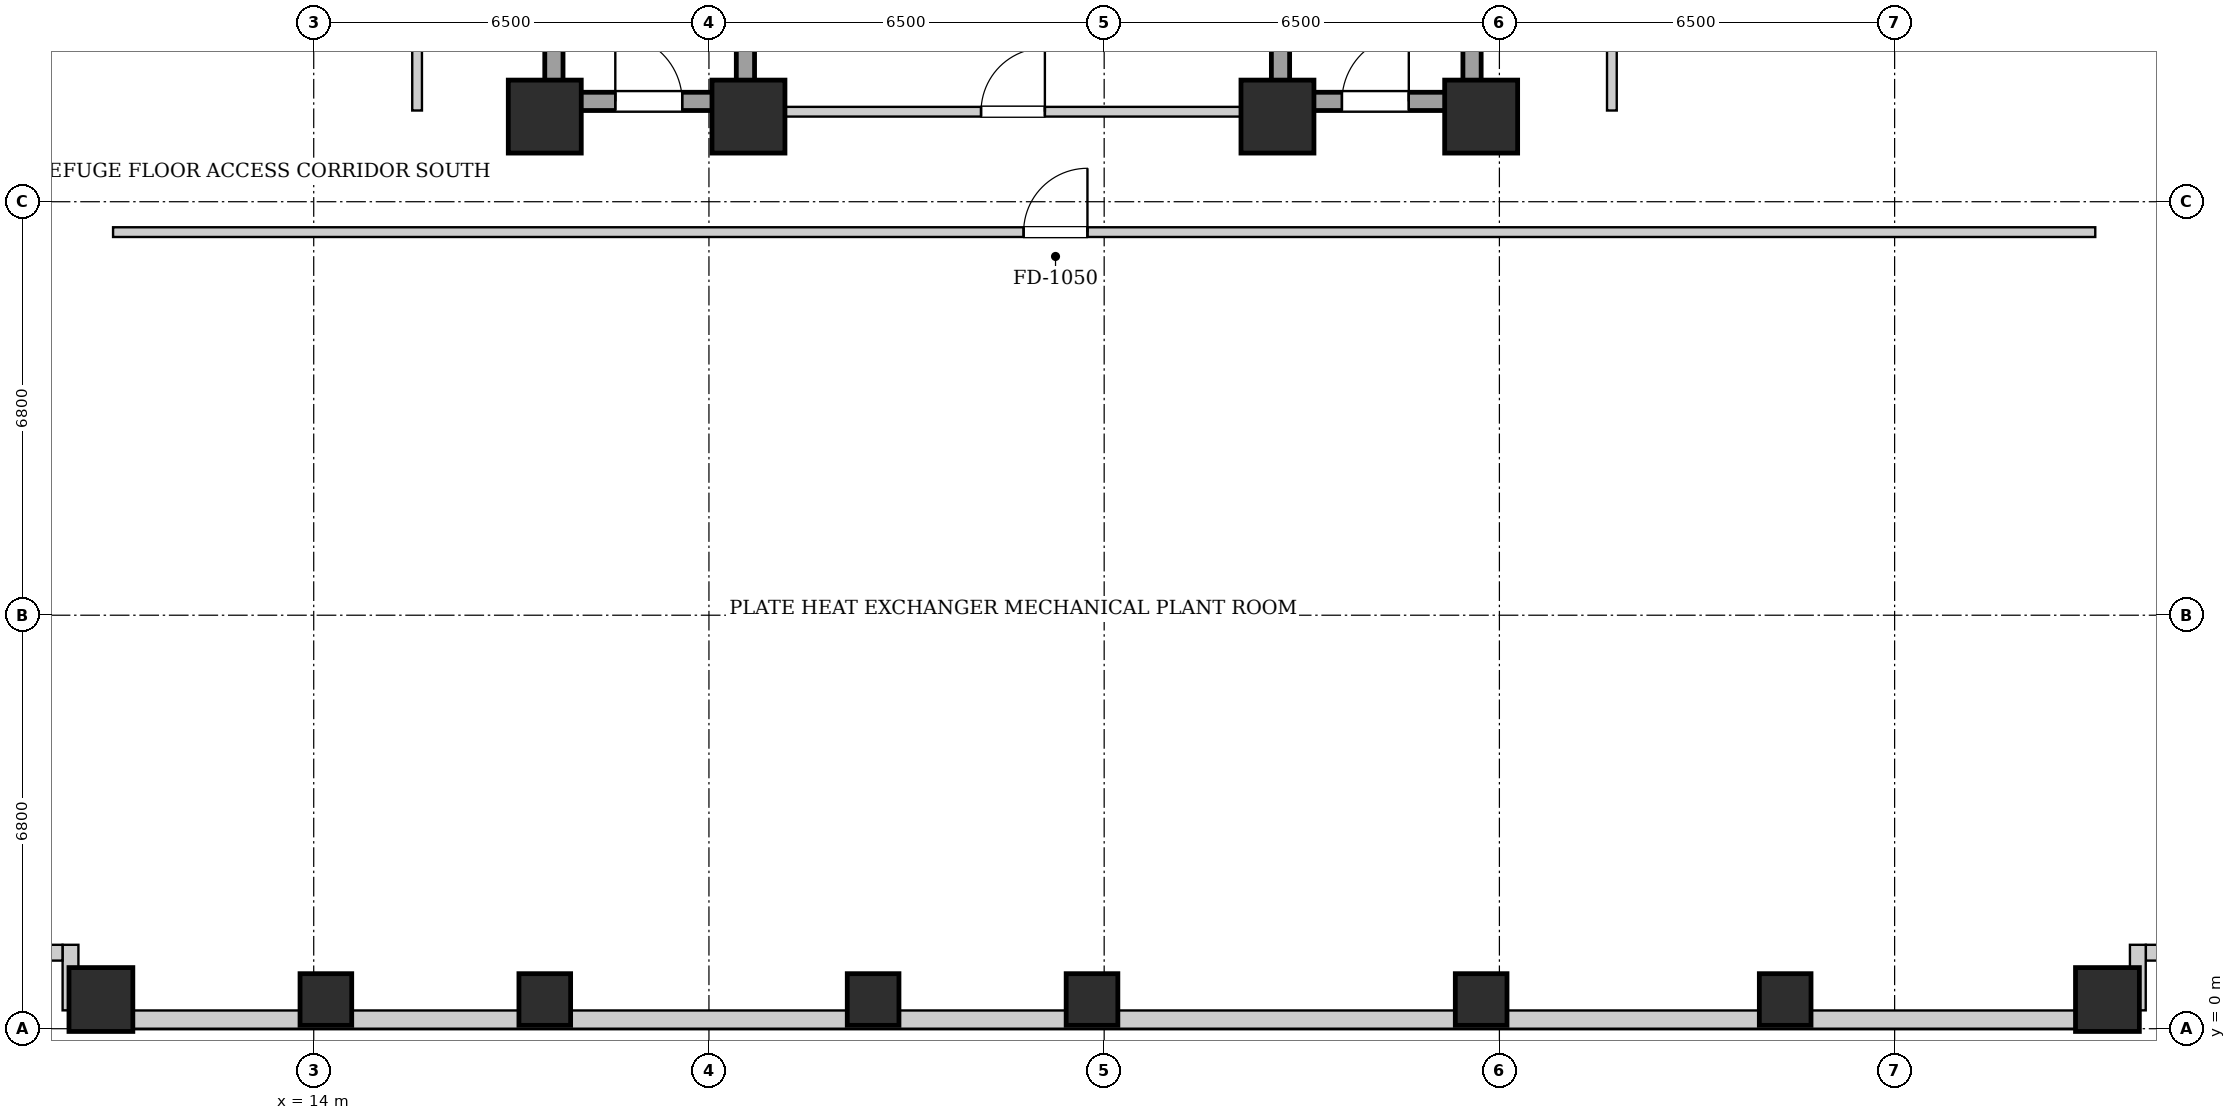
"""IFC4 building model, lengths in metres.
Left out: names, types, materials, properties, quantities, classifications, styles, units other than length and angle.
Written with IfcOpenShell. Run it as: python <this file> out.ifc"""

import sys

from ifc_helpers import new_model, si_unit, direction, frame, frame_2d, origin, origin_2d, place, context, subcontext, project, spatial, rectangle, extrude, element, fill, save


model = new_model("IFC4")
c1 = context("Model", 3, precision=1e-05, world=origin(), true_north=direction((0.0, 1.0)))
c2 = subcontext(c1, "Body", "Model", "MODEL_VIEW")
j1 = project(units=[si_unit("LENGTHUNIT", "METRE"), si_unit("PLANEANGLEUNIT", "RADIAN")], contexts=[c1])
p1 = place(None, origin())
s1 = spatial("IfcSite", under=j1, at=p1, CompositionType="ELEMENT")
p2 = place(p1, origin())
s2 = spatial("IfcBuilding", under=s1, at=p2, CompositionType="ELEMENT")
p3 = place(p2, frame((0.0, 0.0, 70.6)))
s3 = spatial("IfcBuildingStorey", under=s2, at=p3, CompositionType="ELEMENT", Elevation=70.6)
p4 = place(p3, frame((10.5, 0.48, 0.0), z_axis=(0.0, 0.0, 1.0), x_axis=(1.0, 0.0, 0.0)))
e1 = element("IfcColumn", 1, at=p4, inside=s3, PredefinedType="COLUMN", context=c2, shape_type="SweptSolid", body=[
    extrude(rectangle(XDim=1.05, YDim=1.05, at=origin_2d()), origin(), (0.0, 0.0, 1.0), 4.5),
])
for number, where, z_axis, x_axis in (
    (2, (14.2, 0.48, 0.0), (0.0, 0.0, 1.0), (1.0, 0.0, 0.0)),
    (3, (17.8, 0.48, 0.0), (0.0, 0.0, 1.0), (1.0, 0.0, 0.0)),
    (4, (23.2, 0.48, 0.0), (0.0, 0.0, 1.0), (1.0, 0.0, 0.0)),
    (5, (26.8, 0.48, 0.0), (0.0, 0.0, 1.0), (1.0, 0.0, 0.0)),
    (6, (33.2, 0.48, 0.0), (0.0, 0.0, 1.0), (1.0, 0.0, 0.0)),
    (7, (38.2, 0.48, 0.0), (0.0, 0.0, 1.0), (1.0, 0.0, 0.0)),
):
    element("IfcColumn", number, at=place(p3, frame(where, z_axis=z_axis, x_axis=x_axis)), inside=s3, PredefinedType="COLUMN", context=c2, shape_type="SweptSolid", body=[
        extrude(rectangle(XDim=0.85, YDim=0.85, at=origin_2d()), origin(), (0.0, 0.0, 1.0), 4.5),
    ])
p5 = place(p3, frame((43.5, 0.48, 0.0), z_axis=(0.0, 0.0, 1.0), x_axis=(1.0, 0.0, 0.0)))
e8 = element("IfcColumn", 8, at=p5, inside=s3, PredefinedType="COLUMN", context=c2, shape_type="SweptSolid", body=[
    extrude(rectangle(XDim=1.05, YDim=1.05, at=origin_2d()), origin(), (0.0, 0.0, 1.0), 4.5),
])
for number, where, z_axis, x_axis in (
    (9, (17.8, 15.0, 0.0), (0.0, 0.0, 1.0), (1.0, 0.0, 0.0)),
    (10, (21.15, 15.0, 0.0), (0.0, 0.0, 1.0), (1.0, 0.0, 0.0)),
    (11, (29.85, 15.0, 0.0), (0.0, 0.0, 1.0), (1.0, 0.0, 0.0)),
    (12, (33.2, 15.0, 0.0), (0.0, 0.0, 1.0), (1.0, 0.0, 0.0)),
):
    element("IfcColumn", number, at=place(p3, frame(where, z_axis=z_axis, x_axis=x_axis)), inside=s3, PredefinedType="COLUMN", context=c2, shape_type="SweptSolid", body=[
        extrude(rectangle(XDim=1.2, YDim=1.2, at=origin_2d()), origin(), (0.0, 0.0, 1.0), 4.5),
    ])
p6 = place(p3, frame((44.0, 0.15, 0.0), z_axis=(0.0, 0.0, 1.0), x_axis=(-1.0, 0.0, 0.0)))
e13 = element("IfcWall", 13, at=p6, inside=s3, PredefinedType="SOLIDWALL", context=c2, shape_type="SweptSolid", body=[
    extrude(rectangle(XDim=34.0, YDim=0.3, at=frame_2d((17.0, 0.0))), origin(), (0.0, 0.0, 1.0), 2.025),
])
p7 = place(p3, frame((45.118, 1.25, 0.0), z_axis=(0.0, 0.0, 1.0), x_axis=(-1.0, 0.0, 0.0)))
e14 = element("IfcWall", 14, at=p7, inside=s3, PredefinedType="SOLIDWALL", context=c2, shape_type="SweptSolid", body=[
    extrude(rectangle(XDim=0.986, YDim=0.26, at=frame_2d((0.493, 0.0))), origin(), (0.0, 0.0, 1.0), 4.24),
])
for number, where, z_axis, x_axis in (
    (15, (44.0, 1.38, 0.0), (0.0, 0.0, 1.0), (0.0, -1.0, 0.0)),
    (16, (10.0, 0.302, 0.0), (0.0, 0.0, 1.0), (0.0, 1.0, 0.0)),
):
    element("IfcWall", number, at=place(p3, frame(where, z_axis=z_axis, x_axis=x_axis)), inside=s3, PredefinedType="SOLIDWALL", context=c2, shape_type="SweptSolid", body=[
        extrude(rectangle(XDim=1.078, YDim=0.26, at=frame_2d((0.539, 0.0))), origin(), (0.0, 0.0, 1.0), 4.24),
    ])
p8 = place(p3, frame((9.868, 1.25, 0.0), z_axis=(0.0, 0.0, 1.0), x_axis=(-1.0, 0.0, 0.0)))
e17 = element("IfcWall", 17, at=p8, inside=s3, PredefinedType="SOLIDWALL", context=c2, shape_type="SweptSolid", body=[
    extrude(rectangle(XDim=1.248, YDim=0.26, at=frame_2d((0.624, 0.0))), origin(), (0.0, 0.0, 1.0), 4.24),
])
for number, where, z_axis, x_axis in (
    (18, (17.95, 15.1, 0.0), (0.0, 0.0, 1.0), (0.0, 1.0, 0.0)),
    (19, (21.1, 15.1, 0.0), (0.0, 0.0, 1.0), (0.0, 1.0, 0.0)),
):
    element("IfcWall", number, at=place(p3, frame(where, z_axis=z_axis, x_axis=x_axis)), inside=s3, PredefinedType="SHEAR", context=c2, shape_type="SweptSolid", body=[
        extrude(rectangle(XDim=9.0, YDim=0.3, at=frame_2d((4.5, 0.0))), origin(), (0.0, 0.0, 1.0), 4.24),
    ])
p9 = place(p3, frame((18.1, 15.25, 0.0), z_axis=(0.0, 0.0, 1.0), x_axis=(1.0, 0.0, 0.0)))
e20 = element("IfcWall", 20, at=p9, inside=s3, PredefinedType="SHEAR", context=c2, shape_type="SweptSolid", body=[
    extrude(rectangle(XDim=2.85, YDim=0.3, at=frame_2d((1.425, 0.0))), origin(), (0.0, 0.0, 1.0), 4.24),
])
p10 = place(p9, frame((0.86, 0.0, 0.0)))
e21 = element("IfcOpeningElement", 21, at=p10, cuts=e20, PredefinedType="OPENING", context=c2, shape_type="SweptSolid", body=[
    extrude(rectangle(XDim=1.1, YDim=2.05, at=frame_2d((0.55, 1.025))), frame((0.0, 0.16, 0.0), z_axis=(0.0, -1.0, 0.0), x_axis=(1.0, 0.0, 0.0)), (0.0, 0.0, 1.0), 0.32),
])
for number, where, z_axis, x_axis in (
    (22, (29.9, 15.1, 0.0), (0.0, 0.0, 1.0), (0.0, 1.0, 0.0)),
    (23, (33.05, 15.1, 0.0), (0.0, 0.0, 1.0), (0.0, 1.0, 0.0)),
):
    element("IfcWall", number, at=place(p3, frame(where, z_axis=z_axis, x_axis=x_axis)), inside=s3, PredefinedType="SHEAR", context=c2, shape_type="SweptSolid", body=[
        extrude(rectangle(XDim=9.0, YDim=0.3, at=frame_2d((4.5, 0.0))), origin(), (0.0, 0.0, 1.0), 4.24),
    ])
p11 = place(p3, frame((30.05, 15.25, 0.0), z_axis=(0.0, 0.0, 1.0), x_axis=(1.0, 0.0, 0.0)))
e24 = element("IfcWall", 24, at=p11, inside=s3, PredefinedType="SHEAR", context=c2, shape_type="SweptSolid", body=[
    extrude(rectangle(XDim=2.85, YDim=0.3, at=frame_2d((1.425, 0.0))), origin(), (0.0, 0.0, 1.0), 4.24),
])
p12 = place(p11, frame((0.86, 0.0, 0.0)))
e25 = element("IfcOpeningElement", 25, at=p12, cuts=e24, PredefinedType="OPENING", context=c2, shape_type="SweptSolid", body=[
    extrude(rectangle(XDim=1.1, YDim=2.05, at=frame_2d((0.55, 1.025))), frame((0.0, 0.16, 0.0), z_axis=(0.0, -1.0, 0.0), x_axis=(1.0, 0.0, 0.0)), (0.0, 0.0, 1.0), 0.32),
])
p13 = place(p3, frame((21.25, 15.08, 0.0), z_axis=(0.0, 0.0, 1.0), x_axis=(1.0, 0.0, 0.0)))
e26 = element("IfcWall", 26, at=p13, inside=s3, PredefinedType="PARTITIONING", context=c2, shape_type="SweptSolid", body=[
    extrude(rectangle(XDim=8.5, YDim=0.16, at=frame_2d((4.25, 0.0))), origin(), (0.0, 0.0, 1.0), 4.24),
])
p14 = place(p13, frame((3.725, 0.0, 0.0)))
e27 = element("IfcOpeningElement", 27, at=p14, cuts=e26, PredefinedType="OPENING", context=c2, shape_type="SweptSolid", body=[
    extrude(rectangle(XDim=1.05, YDim=2.05, at=frame_2d((0.525, 1.025))), frame((0.0, 0.09, 0.0), z_axis=(0.0, -1.0, 0.0), x_axis=(1.0, 0.0, 0.0)), (0.0, 0.0, 1.0), 0.18),
])
p15 = place(p3, frame((10.7, 13.1, 0.0), z_axis=(0.0, 0.0, 1.0), x_axis=(1.0, 0.0, 0.0)))
e28 = element("IfcWall", 28, at=p15, inside=s3, PredefinedType="PARTITIONING", context=c2, shape_type="SweptSolid", body=[
    extrude(rectangle(XDim=32.6, YDim=0.16, at=frame_2d((16.3, 0.0))), origin(), (0.0, 0.0, 1.0), 4.24),
])
p16 = place(p15, frame((14.975, 0.0, 0.0)))
e29 = element("IfcOpeningElement", 29, at=p16, cuts=e28, PredefinedType="OPENING", context=c2, shape_type="SweptSolid", body=[
    extrude(rectangle(XDim=1.05, YDim=2.05, at=frame_2d((0.525, 1.025))), frame((0.0, 0.09, 0.0), z_axis=(0.0, -1.0, 0.0), x_axis=(1.0, 0.0, 0.0)), (0.0, 0.0, 1.0), 0.18),
])
p17 = place(p3, frame((15.7, 15.1, 0.0), z_axis=(0.0, 0.0, 1.0), x_axis=(0.0, 1.0, 0.0)))
e30 = element("IfcWall", 30, at=p17, inside=s3, PredefinedType="PARTITIONING", context=c2, shape_type="SweptSolid", body=[
    extrude(rectangle(XDim=13.8, YDim=0.16, at=frame_2d((6.9, 0.0))), origin(), (0.0, 0.0, 1.0), 4.24),
])
p18 = place(p17, frame((6.475, 0.0, 0.0)))
e31 = element("IfcOpeningElement", 31, at=p18, cuts=e30, PredefinedType="OPENING", context=c2, shape_type="SweptSolid", body=[
    extrude(rectangle(XDim=1.05, YDim=2.05, at=frame_2d((0.525, 1.025))), frame((0.0, 0.09, 0.0), z_axis=(0.0, -1.0, 0.0), x_axis=(1.0, 0.0, 0.0)), (0.0, 0.0, 1.0), 0.18),
])
p19 = place(p3, frame((35.35, 15.1, 0.0), z_axis=(0.0, 0.0, 1.0), x_axis=(0.0, 1.0, 0.0)))
e32 = element("IfcWall", 32, at=p19, inside=s3, PredefinedType="PARTITIONING", context=c2, shape_type="SweptSolid", body=[
    extrude(rectangle(XDim=13.8, YDim=0.16, at=frame_2d((6.9, 0.0))), origin(), (0.0, 0.0, 1.0), 4.24),
])
p20 = place(p19, frame((6.475, 0.0, 0.0)))
e33 = element("IfcOpeningElement", 33, at=p20, cuts=e32, PredefinedType="OPENING", context=c2, shape_type="SweptSolid", body=[
    extrude(rectangle(XDim=1.05, YDim=2.05, at=frame_2d((0.525, 1.025))), frame((0.0, 0.09, 0.0), z_axis=(0.0, -1.0, 0.0), x_axis=(1.0, 0.0, 0.0)), (0.0, 0.0, 1.0), 0.18),
])
p21 = place(p10, origin())
e34 = element("IfcDoor", 34, at=p21, inside=s3, OperationType="SINGLE_SWING_LEFT", PredefinedType="DOOR", context=c2, shape_type="SweptSolid", body=[
    extrude(rectangle(XDim=1.1, YDim=2.05, at=frame_2d((0.55, 1.025))), frame((0.0, 0.025, 0.0), z_axis=(0.0, -1.0, 0.0), x_axis=(1.0, 0.0, 0.0)), (0.0, 0.0, 1.0), 0.05),
])
fill(e21, e34)
p22 = place(p12, origin())
e35 = element("IfcDoor", 35, at=p22, inside=s3, OperationType="SINGLE_SWING_RIGHT", PredefinedType="DOOR", context=c2, shape_type="SweptSolid", body=[
    extrude(rectangle(XDim=1.1, YDim=2.05, at=frame_2d((0.55, 1.025))), frame((0.0, 0.025, 0.0), z_axis=(0.0, -1.0, 0.0), x_axis=(1.0, 0.0, 0.0)), (0.0, 0.0, 1.0), 0.05),
])
fill(e25, e35)
p23 = place(p14, origin())
e36 = element("IfcDoor", 36, at=p23, inside=s3, OperationType="SINGLE_SWING_RIGHT", PredefinedType="DOOR", context=c2, shape_type="SweptSolid", body=[
    extrude(rectangle(XDim=1.05, YDim=2.05, at=frame_2d((0.525, 1.025))), frame((0.0, 0.025, 0.0), z_axis=(0.0, -1.0, 0.0), x_axis=(1.0, 0.0, 0.0)), (0.0, 0.0, 1.0), 0.05),
])
fill(e27, e36)
p24 = place(p16, origin())
e37 = element("IfcDoor", 37, at=p24, inside=s3, OperationType="SINGLE_SWING_RIGHT", PredefinedType="DOOR", context=c2, shape_type="SweptSolid", body=[
    extrude(rectangle(XDim=1.05, YDim=2.05, at=frame_2d((0.525, 1.025))), frame((0.0, 0.025, 0.0), z_axis=(0.0, -1.0, 0.0), x_axis=(1.0, 0.0, 0.0)), (0.0, 0.0, 1.0), 0.05),
])
fill(e29, e37)
save(model, sys.argv[1])
